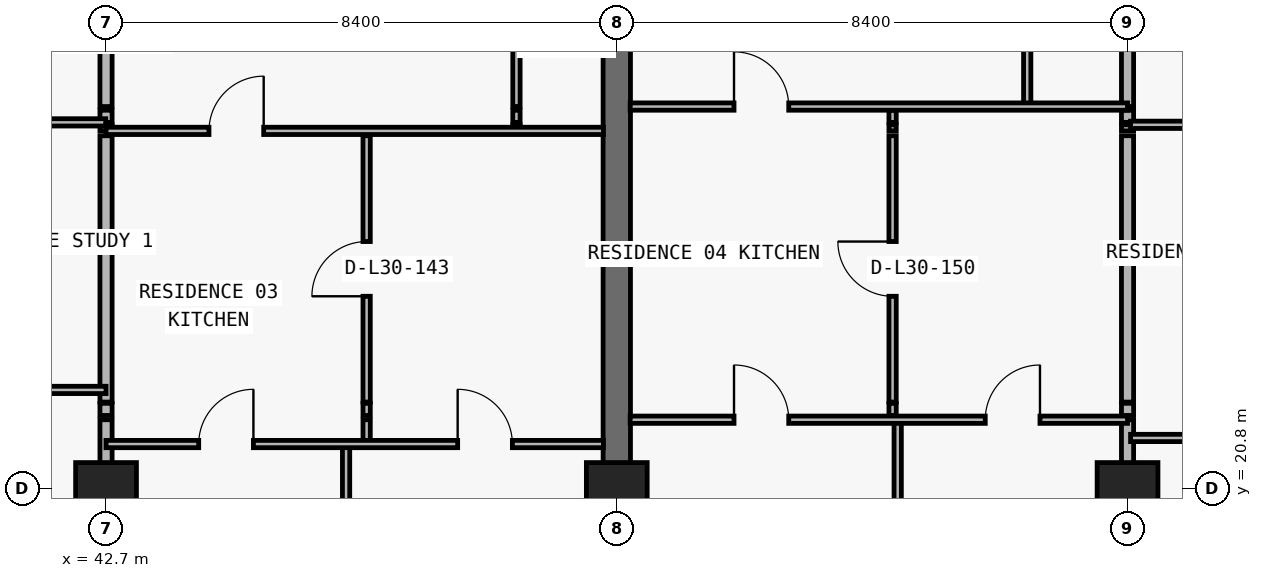
"""IFC4 building model, lengths in metres.
Left out: names, types, materials, properties, quantities, classifications, styles, units other than length and angle.
Written with IfcOpenShell. Run it as: python <this file> out.ifc"""

import sys

from ifc_helpers import new_model, si_unit, direction, frame, frame_2d, origin, origin_2d, place, context, subcontext, project, spatial, rectangle, extrude, element, fill, save


model = new_model("IFC4")
c1 = context("Model", 3, precision=1e-05, world=origin(), true_north=direction((0.0, 1.0)))
c2 = subcontext(c1, "Body", "Model", "MODEL_VIEW")
j1 = project(units=[si_unit("LENGTHUNIT", "METRE"), si_unit("PLANEANGLEUNIT", "RADIAN")], contexts=[c1])
p1 = place(None, origin())
s1 = spatial("IfcSite", under=j1, at=p1, CompositionType="ELEMENT")
p2 = place(p1, origin())
s2 = spatial("IfcBuilding", under=s1, at=p2, CompositionType="ELEMENT")
p3 = place(p2, frame((0.0, 0.0, 112.5)))
s3 = spatial("IfcBuildingStorey", under=s2, at=p3, CompositionType="ELEMENT", Elevation=112.5)
for number, where, z_axis, x_axis in (
    (1, (42.7, 20.8, 0.0), (0.0, 0.0, 1.0), (1.0, 0.0, 0.0)),
    (2, (51.1, 20.8, 0.0), (0.0, 0.0, 1.0), (1.0, 0.0, 0.0)),
    (3, (59.5, 20.8, 0.0), (0.0, 0.0, 1.0), (1.0, 0.0, 0.0)),
):
    element("IfcColumn", number, at=place(p3, frame(where, z_axis=z_axis, x_axis=x_axis)), inside=s3, PredefinedType="COLUMN", context=c2, shape_type="SweptSolid", body=[
        extrude(rectangle(XDim=1.0, YDim=0.85, at=origin_2d()), origin(), (0.0, 0.0, 1.0), 3.05),
    ])
p4 = place(p3, frame((51.1, 20.8, 0.0), z_axis=(0.0, 0.0, 1.0), x_axis=(0.0, 1.0, 0.0)))
e4 = element("IfcWall", 4, at=p4, inside=s3, PredefinedType="SHEAR", context=c2, shape_type="SweptSolid", body=[
    extrude(rectangle(XDim=8.6, YDim=0.45, at=frame_2d((4.3, 0.0))), origin(), (0.0, 0.0, 1.0), 3.05),
])
p5 = place(p3, frame((42.7, 8.84, 0.0), z_axis=(0.0, 0.0, 1.0), x_axis=(0.0, 1.0, 0.0)))
e5 = element("IfcWall", 5, at=p5, inside=s3, PredefinedType="PARTITIONING", context=c2, shape_type="SweptSolid", body=[
    extrude(rectangle(XDim=13.09, YDim=0.2, at=frame_2d((6.545, 0.0))), origin(), (0.0, 0.0, 1.0), 2.174),
])
p6 = place(p3, frame((42.7, 22.0, 0.0), z_axis=(0.0, 0.0, 1.0), x_axis=(0.0, 1.0, 0.0)))
e6 = element("IfcWall", 6, at=p6, inside=s3, PredefinedType="PARTITIONING", context=c2, shape_type="SweptSolid", body=[
    extrude(rectangle(XDim=0.2, YDim=0.2, at=frame_2d((0.1, 0.0))), origin(), (0.0, 0.0, 1.0), 2.174),
])
p7 = place(p3, frame((42.7, 22.22, 0.0), z_axis=(0.0, 0.0, 1.0), x_axis=(0.0, 1.0, 0.0)))
e7 = element("IfcWall", 7, at=p7, inside=s3, PredefinedType="PARTITIONING", context=c2, shape_type="SweptSolid", body=[
    extrude(rectangle(XDim=4.38, YDim=0.2, at=frame_2d((2.19, 0.0))), origin(), (0.0, 0.0, 1.0), 2.174),
])
p8 = place(p3, frame((42.7, 26.68, 0.0), z_axis=(0.0, 0.0, 1.0), x_axis=(0.0, 1.0, 0.0)))
e8 = element("IfcWall", 8, at=p8, inside=s3, PredefinedType="PARTITIONING", context=c2, shape_type="SweptSolid", body=[
    extrude(rectangle(XDim=0.1, YDim=0.2, at=frame_2d((0.05, 0.0))), origin(), (0.0, 0.0, 1.0), 2.174),
])
p9 = place(p3, frame((42.7, 26.82, 0.0), z_axis=(0.0, 0.0, 1.0), x_axis=(0.0, 1.0, 0.0)))
e9 = element("IfcWall", 9, at=p9, inside=s3, PredefinedType="PARTITIONING", context=c2, shape_type="SweptSolid", body=[
    extrude(rectangle(XDim=0.2, YDim=0.2, at=frame_2d((0.1, 0.0))), origin(), (0.0, 0.0, 1.0), 2.174),
])
p10 = place(p3, frame((42.7, 27.08, 0.0), z_axis=(0.0, 0.0, 1.0), x_axis=(0.0, 1.0, 0.0)))
e10 = element("IfcWall", 10, at=p10, inside=s3, PredefinedType="PARTITIONING", context=c2, shape_type="SweptSolid", body=[
    extrude(rectangle(XDim=6.52, YDim=0.2, at=frame_2d((3.26, 0.0))), origin(), (0.0, 0.0, 1.0), 2.174),
])
p11 = place(p3, frame((46.648, 8.84, 0.0), z_axis=(0.0, 0.0, 1.0), x_axis=(0.0, 1.0, 0.0)))
e11 = element("IfcWall", 11, at=p11, inside=s3, PredefinedType="PARTITIONING", context=c2, shape_type="SweptSolid", body=[
    extrude(rectangle(XDim=12.69, YDim=0.12, at=frame_2d((6.345, 0.0))), origin(), (0.0, 0.0, 1.0), 3.05),
])
p12 = place(p3, frame((46.986, 21.53, 0.0), z_axis=(0.0, 0.0, 1.0), x_axis=(0.0, 1.0, 0.0)))
e12 = element("IfcWall", 12, at=p12, inside=s3, PredefinedType="PARTITIONING", context=c2, shape_type="SweptSolid", body=[
    extrude(rectangle(XDim=0.4, YDim=0.12, at=frame_2d((0.2, 0.0))), origin(), (0.0, 0.0, 1.0), 3.05),
])
p13 = place(p3, frame((46.986, 22.0, 0.0), z_axis=(0.0, 0.0, 1.0), x_axis=(0.0, 1.0, 0.0)))
e13 = element("IfcWall", 13, at=p13, inside=s3, PredefinedType="PARTITIONING", context=c2, shape_type="SweptSolid", body=[
    extrude(rectangle(XDim=0.2, YDim=0.12, at=frame_2d((0.1, 0.0))), origin(), (0.0, 0.0, 1.0), 3.05),
])
p14 = place(p3, frame((46.986, 22.22, 0.0), z_axis=(0.0, 0.0, 1.0), x_axis=(0.0, 1.0, 0.0)))
e14 = element("IfcWall", 14, at=p14, inside=s3, PredefinedType="PARTITIONING", context=c2, shape_type="SweptSolid", body=[
    extrude(rectangle(XDim=4.38, YDim=0.12, at=frame_2d((2.19, 0.0))), origin(), (0.0, 0.0, 1.0), 3.05),
])
p15 = place(p14, frame((1.74, 0.0, 0.0)))
e15 = element("IfcOpeningElement", 15, at=p15, cuts=e14, PredefinedType="OPENING", context=c2, shape_type="SweptSolid", body=[
    extrude(rectangle(XDim=0.9, YDim=2.15, at=frame_2d((0.45, 1.075))), frame((0.0, 0.07, 0.0), z_axis=(0.0, -1.0, 0.0), x_axis=(1.0, 0.0, 0.0)), (0.0, 0.0, 1.0), 0.14),
])
p16 = place(p3, frame((49.45, 26.68, 0.0), z_axis=(0.0, 0.0, 1.0), x_axis=(0.0, 1.0, 0.0)))
e16 = element("IfcWall", 16, at=p16, inside=s3, PredefinedType="PARTITIONING", context=c2, shape_type="SweptSolid", body=[
    extrude(rectangle(XDim=0.1, YDim=0.12, at=frame_2d((0.05, 0.0))), origin(), (0.0, 0.0, 1.0), 3.05),
])
p17 = place(p3, frame((49.45, 26.82, 0.0), z_axis=(0.0, 0.0, 1.0), x_axis=(0.0, 1.0, 0.0)))
e17 = element("IfcWall", 17, at=p17, inside=s3, PredefinedType="PARTITIONING", context=c2, shape_type="SweptSolid", body=[
    extrude(rectangle(XDim=0.2, YDim=0.12, at=frame_2d((0.1, 0.0))), origin(), (0.0, 0.0, 1.0), 3.05),
])
p18 = place(p3, frame((49.45, 27.08, 0.0), z_axis=(0.0, 0.0, 1.0), x_axis=(0.0, 1.0, 0.0)))
e18 = element("IfcWall", 18, at=p18, inside=s3, PredefinedType="PARTITIONING", context=c2, shape_type="SweptSolid", body=[
    extrude(rectangle(XDim=6.52, YDim=0.12, at=frame_2d((3.26, 0.0))), origin(), (0.0, 0.0, 1.0), 3.05),
])
p19 = place(p18, frame((3.285, 0.0, 0.0)))
e19 = element("IfcOpeningElement", 19, at=p19, cuts=e18, PredefinedType="OPENING", context=c2, shape_type="SweptSolid", body=[
    extrude(rectangle(XDim=0.85, YDim=2.1, at=frame_2d((0.425, 1.05))), frame((0.0, 0.07, 0.0), z_axis=(0.0, -1.0, 0.0), x_axis=(1.0, 0.0, 0.0)), (0.0, 0.0, 1.0), 0.14),
])
p20 = place(p3, frame((51.1, 8.84, 0.0), z_axis=(0.0, 0.0, 1.0), x_axis=(0.0, 1.0, 0.0)))
e20 = element("IfcWall", 20, at=p20, inside=s3, PredefinedType="PARTITIONING", context=c2, shape_type="SweptSolid", body=[
    extrude(rectangle(XDim=11.955, YDim=0.2, at=frame_2d((5.978, 0.0))), origin(), (0.0, 0.0, 1.0), 2.174),
])
p21 = place(p3, frame((55.636, 22.0, 0.0), z_axis=(0.0, 0.0, 1.0), x_axis=(0.0, 1.0, 0.0)))
e21 = element("IfcWall", 21, at=p21, inside=s3, PredefinedType="PARTITIONING", context=c2, shape_type="SweptSolid", body=[
    extrude(rectangle(XDim=0.2, YDim=0.12, at=frame_2d((0.1, 0.0))), origin(), (0.0, 0.0, 1.0), 3.05),
])
p22 = place(p3, frame((55.636, 22.22, 0.0), z_axis=(0.0, 0.0, 1.0), x_axis=(0.0, 1.0, 0.0)))
e22 = element("IfcWall", 22, at=p22, inside=s3, PredefinedType="PARTITIONING", context=c2, shape_type="SweptSolid", body=[
    extrude(rectangle(XDim=4.38, YDim=0.12, at=frame_2d((2.19, 0.0))), origin(), (0.0, 0.0, 1.0), 3.05),
])
p23 = place(p22, frame((1.74, 0.0, 0.0)))
e23 = element("IfcOpeningElement", 23, at=p23, cuts=e22, PredefinedType="OPENING", context=c2, shape_type="SweptSolid", body=[
    extrude(rectangle(XDim=0.9, YDim=2.15, at=frame_2d((0.45, 1.075))), frame((0.0, 0.07, 0.0), z_axis=(0.0, -1.0, 0.0), x_axis=(1.0, 0.0, 0.0)), (0.0, 0.0, 1.0), 0.14),
])
p24 = place(p3, frame((55.636, 26.68, 0.0), z_axis=(0.0, 0.0, 1.0), x_axis=(0.0, 1.0, 0.0)))
e24 = element("IfcWall", 24, at=p24, inside=s3, PredefinedType="PARTITIONING", context=c2, shape_type="SweptSolid", body=[
    extrude(rectangle(XDim=0.1, YDim=0.12, at=frame_2d((0.05, 0.0))), origin(), (0.0, 0.0, 1.0), 3.05),
])
p25 = place(p3, frame((55.636, 26.82, 0.0), z_axis=(0.0, 0.0, 1.0), x_axis=(0.0, 1.0, 0.0)))
e25 = element("IfcWall", 25, at=p25, inside=s3, PredefinedType="PARTITIONING", context=c2, shape_type="SweptSolid", body=[
    extrude(rectangle(XDim=0.2, YDim=0.12, at=frame_2d((0.1, 0.0))), origin(), (0.0, 0.0, 1.0), 3.05),
])
p26 = place(p3, frame((55.72, 8.84, 0.0), z_axis=(0.0, 0.0, 1.0), x_axis=(0.0, 1.0, 0.0)))
e26 = element("IfcWall", 26, at=p26, inside=s3, PredefinedType="PARTITIONING", context=c2, shape_type="SweptSolid", body=[
    extrude(rectangle(XDim=13.09, YDim=0.12, at=frame_2d((6.545, 0.0))), origin(), (0.0, 0.0, 1.0), 3.05),
])
p27 = place(p3, frame((57.85, 27.08, 0.0), z_axis=(0.0, 0.0, 1.0), x_axis=(0.0, 1.0, 0.0)))
e27 = element("IfcWall", 27, at=p27, inside=s3, PredefinedType="PARTITIONING", context=c2, shape_type="SweptSolid", body=[
    extrude(rectangle(XDim=6.52, YDim=0.12, at=frame_2d((3.26, 0.0))), origin(), (0.0, 0.0, 1.0), 3.05),
])
p28 = place(p27, frame((3.285, 0.0, 0.0)))
e28 = element("IfcOpeningElement", 28, at=p28, cuts=e27, PredefinedType="OPENING", context=c2, shape_type="SweptSolid", body=[
    extrude(rectangle(XDim=0.85, YDim=2.1, at=frame_2d((0.425, 1.05))), frame((0.0, 0.07, 0.0), z_axis=(0.0, -1.0, 0.0), x_axis=(1.0, 0.0, 0.0)), (0.0, 0.0, 1.0), 0.14),
])
p29 = place(p3, frame((59.5, 8.84, 0.0), z_axis=(0.0, 0.0, 1.0), x_axis=(0.0, 1.0, 0.0)))
e29 = element("IfcWall", 29, at=p29, inside=s3, PredefinedType="PARTITIONING", context=c2, shape_type="SweptSolid", body=[
    extrude(rectangle(XDim=13.09, YDim=0.2, at=frame_2d((6.545, 0.0))), origin(), (0.0, 0.0, 1.0), 2.174),
])
p30 = place(p3, frame((59.5, 22.0, 0.0), z_axis=(0.0, 0.0, 1.0), x_axis=(0.0, 1.0, 0.0)))
e30 = element("IfcWall", 30, at=p30, inside=s3, PredefinedType="PARTITIONING", context=c2, shape_type="SweptSolid", body=[
    extrude(rectangle(XDim=0.2, YDim=0.2, at=frame_2d((0.1, 0.0))), origin(), (0.0, 0.0, 1.0), 2.174),
])
p31 = place(p3, frame((59.5, 22.22, 0.0), z_axis=(0.0, 0.0, 1.0), x_axis=(0.0, 1.0, 0.0)))
e31 = element("IfcWall", 31, at=p31, inside=s3, PredefinedType="PARTITIONING", context=c2, shape_type="SweptSolid", body=[
    extrude(rectangle(XDim=4.38, YDim=0.2, at=frame_2d((2.19, 0.0))), origin(), (0.0, 0.0, 1.0), 2.174),
])
p32 = place(p3, frame((59.5, 26.68, 0.0), z_axis=(0.0, 0.0, 1.0), x_axis=(0.0, 1.0, 0.0)))
e32 = element("IfcWall", 32, at=p32, inside=s3, PredefinedType="PARTITIONING", context=c2, shape_type="SweptSolid", body=[
    extrude(rectangle(XDim=0.1, YDim=0.2, at=frame_2d((0.05, 0.0))), origin(), (0.0, 0.0, 1.0), 2.174),
])
p33 = place(p3, frame((59.5, 26.82, 0.0), z_axis=(0.0, 0.0, 1.0), x_axis=(0.0, 1.0, 0.0)))
e33 = element("IfcWall", 33, at=p33, inside=s3, PredefinedType="PARTITIONING", context=c2, shape_type="SweptSolid", body=[
    extrude(rectangle(XDim=0.2, YDim=0.2, at=frame_2d((0.1, 0.0))), origin(), (0.0, 0.0, 1.0), 2.174),
])
p34 = place(p3, frame((59.5, 27.08, 0.0), z_axis=(0.0, 0.0, 1.0), x_axis=(0.0, 1.0, 0.0)))
e34 = element("IfcWall", 34, at=p34, inside=s3, PredefinedType="PARTITIONING", context=c2, shape_type="SweptSolid", body=[
    extrude(rectangle(XDim=6.52, YDim=0.2, at=frame_2d((3.26, 0.0))), origin(), (0.0, 0.0, 1.0), 2.174),
])
p35 = place(p3, frame((42.7, 21.53, 0.0), z_axis=(0.0, 0.0, 1.0), x_axis=(1.0, 0.0, 0.0)))
e35 = element("IfcWall", 35, at=p35, inside=s3, PredefinedType="PARTITIONING", context=c2, shape_type="SweptSolid", body=[
    extrude(rectangle(XDim=8.18, YDim=0.12, at=frame_2d((4.09, 0.0))), origin(), (0.0, 0.0, 1.0), 3.05),
])
p36 = place(p35, frame((1.524, 0.0, 0.0)))
e36 = element("IfcOpeningElement", 36, at=p36, cuts=e35, PredefinedType="OPENING", context=c2, shape_type="SweptSolid", body=[
    extrude(rectangle(XDim=0.9, YDim=2.15, at=frame_2d((0.45, 1.075))), frame((0.0, 0.07, 0.0), z_axis=(0.0, -1.0, 0.0), x_axis=(1.0, 0.0, 0.0)), (0.0, 0.0, 1.0), 0.14),
])
p37 = place(p35, frame((5.783, 0.0, 0.0)))
e37 = element("IfcOpeningElement", 37, at=p37, cuts=e35, PredefinedType="OPENING", context=c2, shape_type="SweptSolid", body=[
    extrude(rectangle(XDim=0.9, YDim=2.15, at=frame_2d((0.45, 1.075))), frame((0.0, 0.07, 0.0), z_axis=(0.0, -1.0, 0.0), x_axis=(1.0, 0.0, 0.0)), (0.0, 0.0, 1.0), 0.14),
])
p38 = place(p3, frame((59.55, 21.63, 0.0), z_axis=(0.0, 0.0, 1.0), x_axis=(1.0, 0.0, 0.0)))
e38 = element("IfcWall", 38, at=p38, inside=s3, PredefinedType="PARTITIONING", context=c2, shape_type="SweptSolid", body=[
    extrude(rectangle(XDim=8.35, YDim=0.12, at=frame_2d((4.175, 0.0))), origin(), (0.0, 0.0, 1.0), 3.05),
])
p39 = place(p38, frame((1.499, 0.0, 0.0)))
e39 = element("IfcOpeningElement", 39, at=p39, cuts=e38, PredefinedType="OPENING", context=c2, shape_type="SweptSolid", body=[
    extrude(rectangle(XDim=0.9, YDim=2.15, at=frame_2d((0.45, 1.075))), frame((0.0, 0.07, 0.0), z_axis=(0.0, -1.0, 0.0), x_axis=(1.0, 0.0, 0.0)), (0.0, 0.0, 1.0), 0.14),
])
p40 = place(p38, frame((6.093, 0.0, 0.0)))
e40 = element("IfcOpeningElement", 40, at=p40, cuts=e38, PredefinedType="OPENING", context=c2, shape_type="SweptSolid", body=[
    extrude(rectangle(XDim=0.9, YDim=2.15, at=frame_2d((0.45, 1.075))), frame((0.0, 0.07, 0.0), z_axis=(0.0, -1.0, 0.0), x_axis=(1.0, 0.0, 0.0)), (0.0, 0.0, 1.0), 0.14),
])
p41 = place(p3, frame((51.32, 21.93, 0.0), z_axis=(0.0, 0.0, 1.0), x_axis=(1.0, 0.0, 0.0)))
e41 = element("IfcWall", 41, at=p41, inside=s3, PredefinedType="PARTITIONING", context=c2, shape_type="SweptSolid", body=[
    extrude(rectangle(XDim=8.18, YDim=0.12, at=frame_2d((4.09, 0.0))), origin(), (0.0, 0.0, 1.0), 3.05),
])
p42 = place(p41, frame((1.708, 0.0, 0.0)))
e42 = element("IfcOpeningElement", 42, at=p42, cuts=e41, PredefinedType="OPENING", context=c2, shape_type="SweptSolid", body=[
    extrude(rectangle(XDim=0.9, YDim=2.15, at=frame_2d((0.45, 1.075))), frame((0.0, 0.07, 0.0), z_axis=(0.0, -1.0, 0.0), x_axis=(1.0, 0.0, 0.0)), (0.0, 0.0, 1.0), 0.14),
])
p43 = place(p41, frame((5.84, 0.0, 0.0)))
e43 = element("IfcOpeningElement", 43, at=p43, cuts=e41, PredefinedType="OPENING", context=c2, shape_type="SweptSolid", body=[
    extrude(rectangle(XDim=0.9, YDim=2.15, at=frame_2d((0.45, 1.075))), frame((0.0, 0.07, 0.0), z_axis=(0.0, -1.0, 0.0), x_axis=(1.0, 0.0, 0.0)), (0.0, 0.0, 1.0), 0.14),
])
p44 = place(p3, frame((35.1, 22.42, 0.0), z_axis=(0.0, 0.0, 1.0), x_axis=(1.0, 0.0, 0.0)))
e44 = element("IfcWall", 44, at=p44, inside=s3, PredefinedType="PARTITIONING", context=c2, shape_type="SweptSolid", body=[
    extrude(rectangle(XDim=7.6, YDim=0.12, at=frame_2d((3.8, 0.0))), origin(), (0.0, 0.0, 1.0), 3.05),
])
p45 = place(p44, frame((3.35, 0.0, 0.0)))
e45 = element("IfcOpeningElement", 45, at=p45, cuts=e44, PredefinedType="OPENING", context=c2, shape_type="SweptSolid", body=[
    extrude(rectangle(XDim=0.9, YDim=2.15, at=frame_2d((0.45, 1.075))), frame((0.0, 0.07, 0.0), z_axis=(0.0, -1.0, 0.0), x_axis=(1.0, 0.0, 0.0)), (0.0, 0.0, 1.0), 0.14),
])
p46 = place(p3, frame((42.7, 26.68, 0.0), z_axis=(0.0, 0.0, 1.0), x_axis=(1.0, 0.0, 0.0)))
e46 = element("IfcWall", 46, at=p46, inside=s3, PredefinedType="PARTITIONING", context=c2, shape_type="SweptSolid", body=[
    extrude(rectangle(XDim=8.18, YDim=0.12, at=frame_2d((4.09, 0.0))), origin(), (0.0, 0.0, 1.0), 3.05),
])
p47 = place(p46, frame((1.693, 0.0, 0.0)))
e47 = element("IfcOpeningElement", 47, at=p47, cuts=e46, PredefinedType="OPENING", context=c2, shape_type="SweptSolid", body=[
    extrude(rectangle(XDim=0.9, YDim=2.15, at=frame_2d((0.45, 1.075))), frame((0.0, 0.07, 0.0), z_axis=(0.0, -1.0, 0.0), x_axis=(1.0, 0.0, 0.0)), (0.0, 0.0, 1.0), 0.14),
])
p48 = place(p3, frame((59.55, 26.78, 0.0), z_axis=(0.0, 0.0, 1.0), x_axis=(1.0, 0.0, 0.0)))
e48 = element("IfcWall", 48, at=p48, inside=s3, PredefinedType="PARTITIONING", context=c2, shape_type="SweptSolid", body=[
    extrude(rectangle(XDim=8.35, YDim=0.12, at=frame_2d((4.175, 0.0))), origin(), (0.0, 0.0, 1.0), 3.05),
])
p49 = place(p48, frame((1.918, 0.0, 0.0)))
e49 = element("IfcOpeningElement", 49, at=p49, cuts=e48, PredefinedType="OPENING", context=c2, shape_type="SweptSolid", body=[
    extrude(rectangle(XDim=0.9, YDim=2.15, at=frame_2d((0.45, 1.075))), frame((0.0, 0.07, 0.0), z_axis=(0.0, -1.0, 0.0), x_axis=(1.0, 0.0, 0.0)), (0.0, 0.0, 1.0), 0.14),
])
p50 = place(p3, frame((35.1, 26.82, 0.0), z_axis=(0.0, 0.0, 1.0), x_axis=(1.0, 0.0, 0.0)))
e50 = element("IfcWall", 50, at=p50, inside=s3, PredefinedType="PARTITIONING", context=c2, shape_type="SweptSolid", body=[
    extrude(rectangle(XDim=7.595, YDim=0.12, at=frame_2d((3.797, 0.0))), origin(), (0.0, 0.0, 1.0), 3.05),
])
p51 = place(p50, frame((2.6, 0.0, 0.0)))
e51 = element("IfcOpeningElement", 51, at=p51, cuts=e50, PredefinedType="OPENING", context=c2, shape_type="SweptSolid", body=[
    extrude(rectangle(XDim=0.9, YDim=2.15, at=frame_2d((0.45, 1.075))), frame((0.0, 0.07, 0.0), z_axis=(0.0, -1.0, 0.0), x_axis=(1.0, 0.0, 0.0)), (0.0, 0.0, 1.0), 0.14),
])
p52 = place(p3, frame((51.32, 27.08, 0.0), z_axis=(0.0, 0.0, 1.0), x_axis=(1.0, 0.0, 0.0)))
e52 = element("IfcWall", 52, at=p52, inside=s3, PredefinedType="PARTITIONING", context=c2, shape_type="SweptSolid", body=[
    extrude(rectangle(XDim=8.18, YDim=0.12, at=frame_2d((4.09, 0.0))), origin(), (0.0, 0.0, 1.0), 3.05),
])
p53 = place(p52, frame((1.708, 0.0, 0.0)))
e53 = element("IfcOpeningElement", 53, at=p53, cuts=e52, PredefinedType="OPENING", context=c2, shape_type="SweptSolid", body=[
    extrude(rectangle(XDim=0.9, YDim=2.15, at=frame_2d((0.45, 1.075))), frame((0.0, 0.07, 0.0), z_axis=(0.0, -1.0, 0.0), x_axis=(1.0, 0.0, 0.0)), (0.0, 0.0, 1.0), 0.14),
])
p54 = place(p47, origin())
e54 = element("IfcDoor", 54, at=p54, inside=s3, OperationType="SINGLE_SWING_RIGHT", PredefinedType="DOOR", context=c2, shape_type="SweptSolid", body=[
    extrude(rectangle(XDim=0.9, YDim=2.15, at=frame_2d((0.45, 1.075))), frame((0.0, 0.025, 0.0), z_axis=(0.0, -1.0, 0.0), x_axis=(1.0, 0.0, 0.0)), (0.0, 0.0, 1.0), 0.05),
])
fill(e47, e54)
p55 = place(p15, origin())
e55 = element("IfcDoor", 55, at=p55, inside=s3, OperationType="SINGLE_SWING_LEFT", PredefinedType="DOOR", context=c2, shape_type="SweptSolid", body=[
    extrude(rectangle(XDim=0.9, YDim=2.15, at=frame_2d((0.45, 1.075))), frame((0.0, 0.025, 0.0), z_axis=(0.0, -1.0, 0.0), x_axis=(1.0, 0.0, 0.0)), (0.0, 0.0, 1.0), 0.05),
])
fill(e15, e55)
p56 = place(p36, origin())
e56 = element("IfcDoor", 56, at=p56, inside=s3, OperationType="SINGLE_SWING_RIGHT", PredefinedType="DOOR", context=c2, shape_type="SweptSolid", body=[
    extrude(rectangle(XDim=0.9, YDim=2.15, at=frame_2d((0.45, 1.075))), frame((0.0, 0.025, 0.0), z_axis=(0.0, -1.0, 0.0), x_axis=(1.0, 0.0, 0.0)), (0.0, 0.0, 1.0), 0.05),
])
fill(e36, e56)
p57 = place(p37, origin())
e57 = element("IfcDoor", 57, at=p57, inside=s3, OperationType="SINGLE_SWING_LEFT", PredefinedType="DOOR", context=c2, shape_type="SweptSolid", body=[
    extrude(rectangle(XDim=0.9, YDim=2.15, at=frame_2d((0.45, 1.075))), frame((0.0, 0.025, 0.0), z_axis=(0.0, -1.0, 0.0), x_axis=(1.0, 0.0, 0.0)), (0.0, 0.0, 1.0), 0.05),
])
fill(e37, e57)
p58 = place(p53, origin())
e58 = element("IfcDoor", 58, at=p58, inside=s3, OperationType="SINGLE_SWING_LEFT", PredefinedType="DOOR", context=c2, shape_type="SweptSolid", body=[
    extrude(rectangle(XDim=0.9, YDim=2.15, at=frame_2d((0.45, 1.075))), frame((0.0, 0.025, 0.0), z_axis=(0.0, -1.0, 0.0), x_axis=(1.0, 0.0, 0.0)), (0.0, 0.0, 1.0), 0.05),
])
fill(e53, e58)
p59 = place(p23, origin())
e59 = element("IfcDoor", 59, at=p59, inside=s3, OperationType="SINGLE_SWING_RIGHT", PredefinedType="DOOR", context=c2, shape_type="SweptSolid", body=[
    extrude(rectangle(XDim=0.9, YDim=2.15, at=frame_2d((0.45, 1.075))), frame((0.0, 0.025, 0.0), z_axis=(0.0, -1.0, 0.0), x_axis=(1.0, 0.0, 0.0)), (0.0, 0.0, 1.0), 0.05),
])
fill(e23, e59)
p60 = place(p42, origin())
e60 = element("IfcDoor", 60, at=p60, inside=s3, OperationType="SINGLE_SWING_LEFT", PredefinedType="DOOR", context=c2, shape_type="SweptSolid", body=[
    extrude(rectangle(XDim=0.9, YDim=2.15, at=frame_2d((0.45, 1.075))), frame((0.0, 0.025, 0.0), z_axis=(0.0, -1.0, 0.0), x_axis=(1.0, 0.0, 0.0)), (0.0, 0.0, 1.0), 0.05),
])
fill(e42, e60)
p61 = place(p43, origin())
e61 = element("IfcDoor", 61, at=p61, inside=s3, OperationType="SINGLE_SWING_RIGHT", PredefinedType="DOOR", context=c2, shape_type="SweptSolid", body=[
    extrude(rectangle(XDim=0.9, YDim=2.15, at=frame_2d((0.45, 1.075))), frame((0.0, 0.025, 0.0), z_axis=(0.0, -1.0, 0.0), x_axis=(1.0, 0.0, 0.0)), (0.0, 0.0, 1.0), 0.05),
])
fill(e43, e61)
save(model, sys.argv[1])
